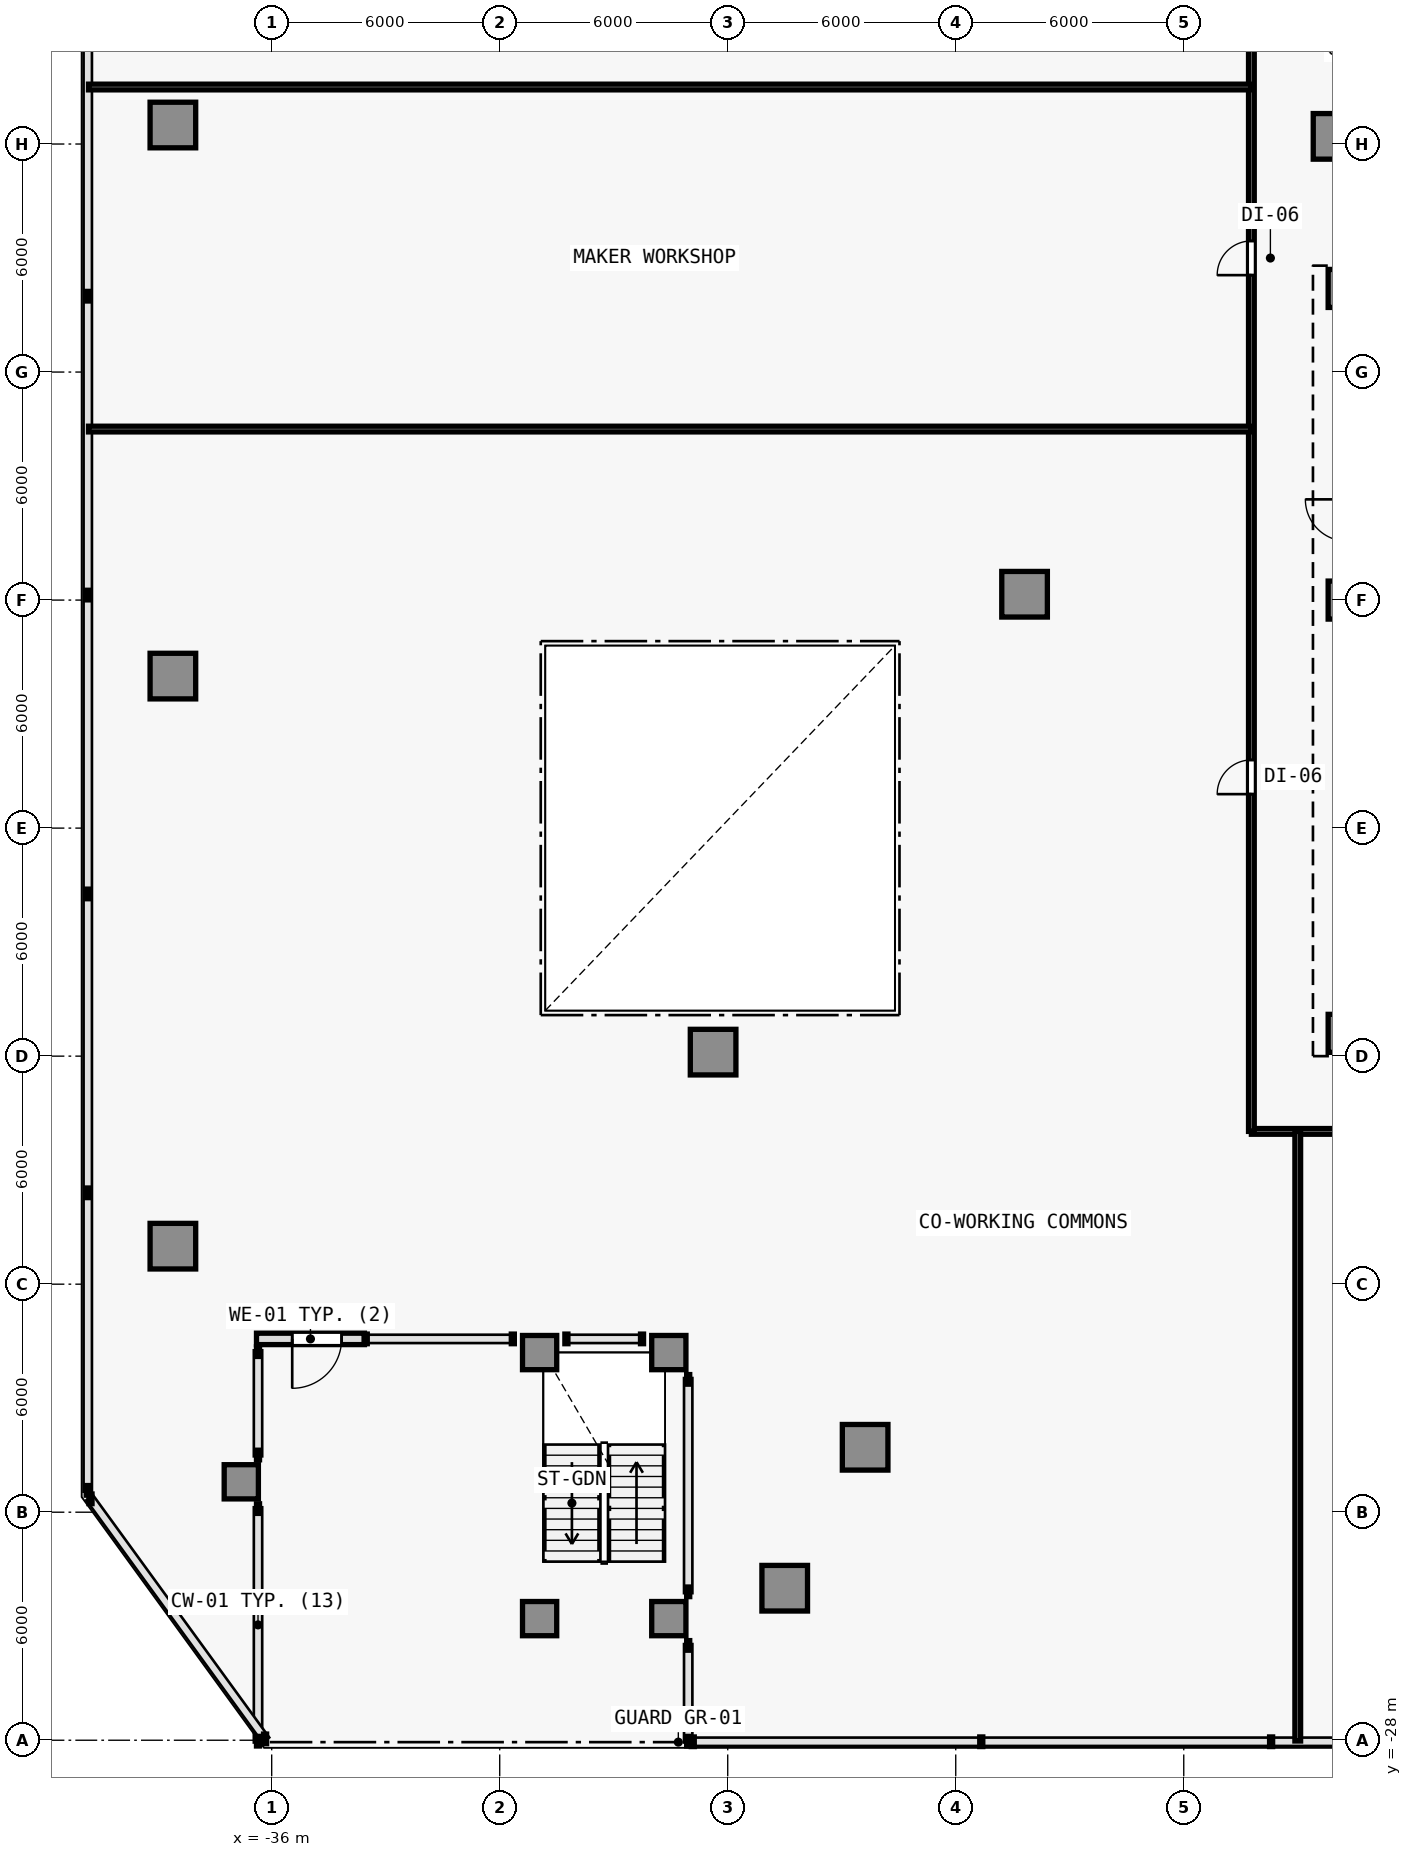
"""IFC4 building model, lengths in metres.
Left out: names, types, materials, properties, quantities, classifications, styles, units other than length and angle.
Written with IfcOpenShell. Run it as: python <this file> out.ifc"""

import sys

from ifc_helpers import new_model, si_unit, direction, frame, frame_2d, origin, origin_2d, place, context, subcontext, project, spatial, rectangle, extrude, element, fill, save


model = new_model("IFC4")
c1 = context("Model", 3, precision=1e-05, world=origin(), true_north=direction((0.0, 1.0)))
c2 = subcontext(c1, "Body", "Model", "MODEL_VIEW")
j1 = project(units=[si_unit("LENGTHUNIT", "METRE"), si_unit("PLANEANGLEUNIT", "RADIAN")], contexts=[c1])
p1 = place(None, origin())
s1 = spatial("IfcSite", under=j1, at=p1, CompositionType="ELEMENT")
p2 = place(p1, origin())
s2 = spatial("IfcBuilding", under=s1, at=p2, CompositionType="ELEMENT")
p3 = place(p2, frame((0.0, 0.0, 17.6)))
s3 = spatial("IfcBuildingStorey", under=s2, at=p3, CompositionType="ELEMENT", Elevation=17.6)
for number, where, z_axis, x_axis in (
    (1, (-7.7, -9.4, 0.0), (0.0, 0.0, 1.0), (1.0, 0.0, 0.0)),
    (2, (-7.7, 10.2, 0.0), (0.0, 0.0, 1.0), (1.0, 0.0, 0.0)),
    (3, (-7.7, 2.0, 0.0), (0.0, 0.0, 1.0), (1.0, 0.0, 0.0)),
):
    element("IfcColumn", number, at=place(p3, frame(where, z_axis=z_axis, x_axis=x_axis)), inside=s3, PredefinedType="COLUMN", context=c2, shape_type="SweptSolid", body=[
        extrude(rectangle(XDim=1.0, YDim=1.0, at=origin_2d()), origin(), (0.0, 0.0, 1.0), 4.2),
    ])
for number, where, z_axis, x_axis in (
    (4, (-38.6, 14.5, 0.0), (0.0, 0.0, 1.0), (1.0, 0.0, 0.0)),
    (5, (-38.6, 0.0, 0.0), (0.0, 0.0, 1.0), (1.0, 0.0, 0.0)),
    (6, (-38.6, -15.0, 0.0), (0.0, 0.0, 1.0), (1.0, 0.0, 0.0)),
    (7, (-22.5, -24.0, 0.0), (0.0, 0.0, 1.0), (1.0, 0.0, 0.0)),
    (8, (-20.384, -20.292, 0.0), (0.0, 0.0, 1.0), (1.0, 0.0, 0.0)),
    (9, (-7.992, 14.202, 0.0), (0.0, 0.0, 1.0), (1.0, 0.0, 0.0)),
    (10, (-16.188, 2.154, 0.0), (0.0, 0.0, 1.0), (1.0, 0.0, 0.0)),
    (11, (-24.385, -9.894, 0.0), (0.0, 0.0, 1.0), (1.0, 0.0, 0.0)),
):
    element("IfcColumn", number, at=place(p3, frame(where, z_axis=z_axis, x_axis=x_axis)), inside=s3, PredefinedType="COLUMN", context=c2, shape_type="SweptSolid", body=[
        extrude(rectangle(XDim=1.2, YDim=1.2, at=origin_2d()), origin(), (0.0, 0.0, 1.0), 4.2),
    ])
for number, where, z_axis, x_axis in (
    (12, (-36.8, -21.2, 0.0), (0.0, 0.0, 1.0), (1.0, 0.0, 0.0)),
    (13, (-28.95, -24.8, 0.0), (0.0, 0.0, 1.0), (1.0, 0.0, 0.0)),
    (14, (-25.55, -24.8, 0.0), (0.0, 0.0, 1.0), (1.0, 0.0, 0.0)),
    (15, (-28.95, -17.8, 0.0), (0.0, 0.0, 1.0), (1.0, 0.0, 0.0)),
    (16, (-25.55, -17.8, 0.0), (0.0, 0.0, 1.0), (1.0, 0.0, 0.0)),
):
    element("IfcColumn", number, at=place(p3, frame(where, z_axis=z_axis, x_axis=x_axis)), inside=s3, PredefinedType="COLUMN", context=c2, shape_type="SweptSolid", body=[
        extrude(rectangle(XDim=0.9, YDim=0.9, at=origin_2d()), origin(), (0.0, 0.0, 1.0), 4.2),
    ])
p4 = place(p3, frame((-33.56, -17.44, 0.0), z_axis=(0.0, 0.0, 1.0), x_axis=(-1.0, 0.0, 0.0)))
e17 = element("IfcWall", 17, at=p4, inside=s3, PredefinedType="SOLIDWALL", context=c2, shape_type="SweptSolid", body=[
    extrude(rectangle(XDim=2.84, YDim=0.3, at=frame_2d((1.42, 0.0))), origin(), (0.0, 0.0, 1.0), 3.88),
])
p5 = place(p4, frame((0.6, 0.0, 0.0)))
e18 = element("IfcOpeningElement", 18, at=p5, cuts=e17, PredefinedType="OPENING", context=c2, shape_type="SweptSolid", body=[
    extrude(rectangle(XDim=1.3, YDim=2.2, at=frame_2d((0.65, 1.1))), frame((0.0, 0.16, 0.0), z_axis=(0.0, -1.0, 0.0), x_axis=(1.0, 0.0, 0.0)), (0.0, 0.0, 1.0), 0.32),
])
p6 = place(p3, frame((-10.22, -11.98, 0.0), z_axis=(0.0, 0.0, 1.0), x_axis=(1.0, 0.0, 0.0)))
e19 = element("IfcWall", 19, at=p6, inside=s3, PredefinedType="PARTITIONING", context=c2, shape_type="SweptSolid", body=[
    extrude(rectangle(XDim=33.5, YDim=0.15, at=frame_2d((16.75, 0.0))), origin(), (0.0, 0.0, 1.0), 3.155),
])
p7 = place(p6, frame((8.52, 0.0, 0.0)))
e20 = element("IfcOpeningElement", 20, at=p7, cuts=e19, PredefinedType="OPENING", context=c2, shape_type="SweptSolid", body=[
    extrude(rectangle(XDim=0.9, YDim=2.1, at=frame_2d((0.45, 1.05))), frame((0.0, 0.085, 0.0), z_axis=(0.0, -1.0, 0.0), x_axis=(1.0, 0.0, 0.0)), (0.0, 0.0, 1.0), 0.17),
])
p8 = place(p6, frame((23.27, 0.0, 0.0)))
e21 = element("IfcOpeningElement", 21, at=p8, cuts=e19, PredefinedType="OPENING", context=c2, shape_type="SweptSolid", body=[
    extrude(rectangle(XDim=0.9, YDim=2.1, at=frame_2d((0.45, 1.05))), frame((0.0, 0.085, 0.0), z_axis=(0.0, -1.0, 0.0), x_axis=(1.0, 0.0, 0.0)), (0.0, 0.0, 1.0), 0.17),
])
p9 = place(p3, frame((-10.22, -11.98, 0.0), z_axis=(0.0, 0.0, 1.0), x_axis=(0.0, 1.0, 0.0)))
e22 = element("IfcWall", 22, at=p9, inside=s3, PredefinedType="PARTITIONING", context=c2, shape_type="SweptSolid", body=[
    extrude(rectangle(XDim=30.26, YDim=0.15, at=frame_2d((15.13, 0.0))), origin(), (0.0, 0.0, 1.0), 3.155),
])
p10 = place(p9, frame((8.874, 0.0, 0.0)))
e23 = element("IfcOpeningElement", 23, at=p10, cuts=e22, PredefinedType="OPENING", context=c2, shape_type="SweptSolid", body=[
    extrude(rectangle(XDim=0.9, YDim=2.1, at=frame_2d((0.45, 1.05))), frame((0.0, 0.085, 0.0), z_axis=(0.0, -1.0, 0.0), x_axis=(1.0, 0.0, 0.0)), (0.0, 0.0, 1.0), 0.17),
])
p11 = place(p9, frame((22.53, 0.0, 0.0)))
e24 = element("IfcOpeningElement", 24, at=p11, cuts=e22, PredefinedType="OPENING", context=c2, shape_type="SweptSolid", body=[
    extrude(rectangle(XDim=0.9, YDim=2.1, at=frame_2d((0.45, 1.05))), frame((0.0, 0.085, 0.0), z_axis=(0.0, -1.0, 0.0), x_axis=(1.0, 0.0, 0.0)), (0.0, 0.0, 1.0), 0.17),
])
p12 = place(p3, frame((-9.0, -28.02, 0.0), z_axis=(0.0, 0.0, 1.0), x_axis=(0.0, 1.0, 0.0)))
e25 = element("IfcWall", 25, at=p12, inside=s3, PredefinedType="PARTITIONING", context=c2, shape_type="SweptSolid", body=[
    extrude(rectangle(XDim=16.04, YDim=0.15, at=frame_2d((8.02, 0.0))), origin(), (0.0, 0.0, 1.0), 3.155),
])
p13 = place(p3, frame((-40.82, 6.5, 0.0), z_axis=(0.0, 0.0, 1.0), x_axis=(1.0, 0.0, 0.0)))
e26 = element("IfcWall", 26, at=p13, inside=s3, PredefinedType="PARTITIONING", context=c2, shape_type="SweptSolid", body=[
    extrude(rectangle(XDim=30.6, YDim=0.15, at=frame_2d((15.3, 0.0))), origin(), (0.0, 0.0, 1.0), 3.265),
])
p14 = place(p3, frame((-40.82, 15.5, 0.0), z_axis=(0.0, 0.0, 1.0), x_axis=(1.0, 0.0, 0.0)))
e27 = element("IfcWall", 27, at=p14, inside=s3, PredefinedType="PARTITIONING", context=c2, shape_type="SweptSolid", body=[
    extrude(rectangle(XDim=30.6, YDim=0.15, at=frame_2d((15.3, 0.0))), origin(), (0.0, 0.0, 1.0), 3.155),
])
p15 = place(p5, origin())
e28 = element("IfcDoor", 28, at=p15, inside=s3, OperationType="SINGLE_SWING_RIGHT", PredefinedType="DOOR", context=c2, shape_type="SweptSolid", body=[
    extrude(rectangle(XDim=1.3, YDim=2.2, at=frame_2d((0.65, 1.1))), frame((0.0, 0.025, 0.0), z_axis=(0.0, -1.0, 0.0), x_axis=(1.0, 0.0, 0.0)), (0.0, 0.0, 1.0), 0.05),
])
fill(e18, e28)
p16 = place(p10, origin())
e29 = element("IfcDoor", 29, at=p16, inside=s3, OperationType="SINGLE_SWING_LEFT", PredefinedType="DOOR", context=c2, shape_type="SweptSolid", body=[
    extrude(rectangle(XDim=0.9, YDim=2.1, at=frame_2d((0.45, 1.05))), frame((0.0, 0.025, 0.0), z_axis=(0.0, -1.0, 0.0), x_axis=(1.0, 0.0, 0.0)), (0.0, 0.0, 1.0), 0.05),
])
fill(e23, e29)
p17 = place(p11, origin())
e30 = element("IfcDoor", 30, at=p17, inside=s3, OperationType="SINGLE_SWING_LEFT", PredefinedType="DOOR", context=c2, shape_type="SweptSolid", body=[
    extrude(rectangle(XDim=0.9, YDim=2.1, at=frame_2d((0.45, 1.05))), frame((0.0, 0.025, 0.0), z_axis=(0.0, -1.0, 0.0), x_axis=(1.0, 0.0, 0.0)), (0.0, 0.0, 1.0), 0.05),
])
fill(e24, e30)
save(model, sys.argv[1])
